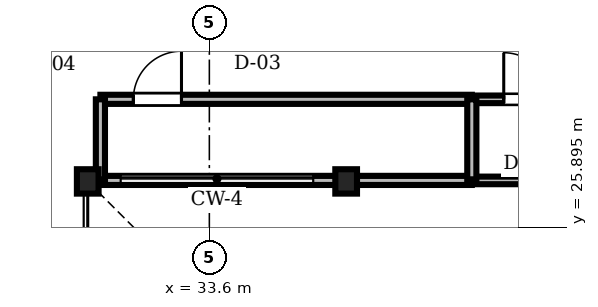
"""IFC4 building model, lengths in metres.
Left out: names, types, materials, properties, quantities, classifications, styles, units other than length and angle.
Written with IfcOpenShell. Run it as: python <this file> out.ifc"""

import sys

from ifc_helpers import new_model, si_unit, direction, frame, frame_2d, origin, origin_2d, place, context, subcontext, project, spatial, rectangle, i_section, extrude, source, transform, mapped, element, fill, save


model = new_model("IFC4")
c1 = context("Model", 3, precision=1e-05, world=origin(), true_north=direction((0.0, 1.0)))
c2 = subcontext(c1, "Body", "Model", "MODEL_VIEW")
j1 = project(units=[si_unit("LENGTHUNIT", "METRE"), si_unit("PLANEANGLEUNIT", "RADIAN")], contexts=[c1])
p1 = place(None, origin())
s1 = spatial("IfcSite", under=j1, at=p1, CompositionType="ELEMENT")
p2 = place(p1, origin())
s2 = spatial("IfcBuilding", under=s1, at=p2, CompositionType="ELEMENT")
p3 = place(p2, frame((0.0, 0.0, 38.55)))
s3 = spatial("IfcBuildingStorey", under=s2, at=p3, CompositionType="ELEMENT", Elevation=38.55)
m1 = source(origin(), c2, "Body", "SweptSolid", [
    extrude(i_section(OverallWidth=0.428, OverallDepth=0.481, WebThickness=0.04, FlangeThickness=0.063, FilletRadius=0.015, at=origin_2d()), origin(), (0.0, 0.0, 1.0), 3.41),
])
for number, where, z_axis, x_axis in (
    (1, (36.3, 26.8, 0.0), (0.0, 0.0, 1.0), (1.0, 0.0, 0.0)),
    (2, (31.2, 26.8, 0.0), (0.0, 0.0, 1.0), (1.0, 0.0, 0.0)),
):
    element("IfcColumn", number, at=place(p3, frame(where, z_axis=z_axis, x_axis=x_axis)), inside=s3, PredefinedType="COLUMN", context=c2, shape_type="MappedRepresentation", body=[
        mapped(m1, transform((0.0, 0.0, 0.0), scale=1.0)),
    ])
m2 = source(origin(), c2, "Body", "SweptSolid", [
    extrude(rectangle(XDim=7.33, YDim=0.18, at=frame_2d((3.665, 0.0))), origin(), (0.0, 0.0, 1.0), 3.042),
])
p4 = place(p3, frame((31.45, 28.42, 0.0), z_axis=(0.0, 0.0, 1.0), x_axis=(1.0, 0.0, 0.0)))
e3 = element("IfcWall", 3, at=p4, inside=s3, PredefinedType="PARTITIONING", context=c2, shape_type="MappedRepresentation", body=[
    mapped(m2, transform((0.0, 0.0, 0.0), scale=1.0)),
])
m3 = source(origin(), c2, "Body", "SweptSolid", [
    extrude(rectangle(XDim=0.95, YDim=2.15, at=frame_2d((0.475, 1.075))), frame((0.0, 0.1, 0.0), z_axis=(0.0, -1.0, 0.0), x_axis=(1.0, 0.0, 0.0)), (0.0, 0.0, 1.0), 0.2),
])
p5 = place(p4, frame((0.65, 0.0, 0.0)))
e4 = element("IfcOpeningElement", 4, at=p5, cuts=e3, PredefinedType="OPENING", context=c2, shape_type="MappedRepresentation", body=[
    mapped(m3, transform((0.0, 0.0, 0.0), scale=1.0)),
])
m4 = source(origin(), c2, "Body", "SweptSolid", [
    extrude(rectangle(XDim=2.74, YDim=0.15, at=frame_2d((1.37, 0.0))), origin(), (0.0, 0.0, 1.0), 3.41),
])
p6 = place(p3, frame((38.78, 28.42, 0.0), z_axis=(0.0, 0.0, 1.0), x_axis=(1.0, 0.0, 0.0)))
e5 = element("IfcWall", 5, at=p6, inside=s3, PredefinedType="PARTITIONING", context=c2, shape_type="MappedRepresentation", body=[
    mapped(m4, transform((0.0, 0.0, 0.0), scale=1.0)),
])
m5 = source(origin(), c2, "Body", "SweptSolid", [
    extrude(rectangle(XDim=0.92, YDim=2.1, at=frame_2d((0.46, 1.05))), frame((0.0, 0.085, 0.0), z_axis=(0.0, -1.0, 0.0), x_axis=(1.0, 0.0, 0.0)), (0.0, 0.0, 1.0), 0.17),
])
p7 = place(p6, frame((0.63, 0.0, 0.0)))
e6 = element("IfcOpeningElement", 6, at=p7, cuts=e5, PredefinedType="OPENING", context=c2, shape_type="MappedRepresentation", body=[
    mapped(m5, transform((0.0, 0.0, 0.0), scale=1.0)),
])
m6 = source(origin(), c2, "Body", "SweptSolid", [
    extrude(rectangle(XDim=7.33, YDim=0.18, at=frame_2d((3.665, 0.0))), origin(), (0.0, 0.0, 1.0), 2.952),
])
p8 = place(p3, frame((31.45, 26.82, 0.0), z_axis=(0.0, 0.0, 1.0), x_axis=(1.0, 0.0, 0.0)))
e7 = element("IfcWall", 7, at=p8, inside=s3, PredefinedType="PARTITIONING", context=c2, shape_type="MappedRepresentation", body=[
    mapped(m6, transform((0.0, 0.0, 0.0), scale=1.0)),
])
m7 = source(origin(), c2, "Body", "SweptSolid", [
    extrude(rectangle(XDim=2.74, YDim=0.15, at=frame_2d((1.37, 0.0))), origin(), (0.0, 0.0, 1.0), 2.802),
])
p9 = place(p3, frame((38.78, 26.82, 0.0), z_axis=(0.0, 0.0, 1.0), x_axis=(1.0, 0.0, 0.0)))
e8 = element("IfcWall", 8, at=p9, inside=s3, PredefinedType="PARTITIONING", context=c2, shape_type="MappedRepresentation", body=[
    mapped(m7, transform((0.0, 0.0, 0.0), scale=1.0)),
])
m8 = source(origin(), c2, "Body", "SweptSolid", [
    extrude(rectangle(XDim=1.6, YDim=0.18, at=frame_2d((0.8, 0.0))), origin(), (0.0, 0.0, 1.0), 2.952),
])
for number, where, z_axis, x_axis in (
    (9, (31.45, 26.82, 0.0), (0.0, 0.0, 1.0), (0.0, 1.0, 0.0)),
    (10, (38.78, 26.82, 0.0), (0.0, 0.0, 1.0), (0.0, 1.0, 0.0)),
):
    element("IfcWall", number, at=place(p3, frame(where, z_axis=z_axis, x_axis=x_axis)), inside=s3, PredefinedType="PARTITIONING", context=c2, shape_type="MappedRepresentation", body=[
        mapped(m8, transform((0.0, 0.0, 0.0), scale=1.0)),
    ])
m9 = source(origin(), c2, "Body", "SweptSolid", [
    extrude(rectangle(XDim=0.95, YDim=2.15, at=frame_2d((0.475, 1.075))), frame((0.0, 0.025, 0.0), z_axis=(0.0, -1.0, 0.0), x_axis=(1.0, 0.0, 0.0)), (0.0, 0.0, 1.0), 0.05),
])
p10 = place(p5, origin())
e11 = element("IfcDoor", 11, at=p10, inside=s3, OperationType="SINGLE_SWING_RIGHT", PredefinedType="DOOR", context=c2, shape_type="MappedRepresentation", body=[
    mapped(m9, transform((0.0, 0.0, 0.0), scale=1.0)),
])
fill(e4, e11)
m10 = source(origin(), c2, "Body", "SweptSolid", [
    extrude(rectangle(XDim=0.92, YDim=2.1, at=frame_2d((0.46, 1.05))), frame((0.0, 0.025, 0.0), z_axis=(0.0, -1.0, 0.0), x_axis=(1.0, 0.0, 0.0)), (0.0, 0.0, 1.0), 0.05),
])
p11 = place(p7, origin())
e12 = element("IfcDoor", 12, at=p11, inside=s3, OperationType="SINGLE_SWING_LEFT", PredefinedType="DOOR", context=c2, shape_type="MappedRepresentation", body=[
    mapped(m10, transform((0.0, 0.0, 0.0), scale=1.0)),
])
fill(e6, e12)
save(model, sys.argv[1])
